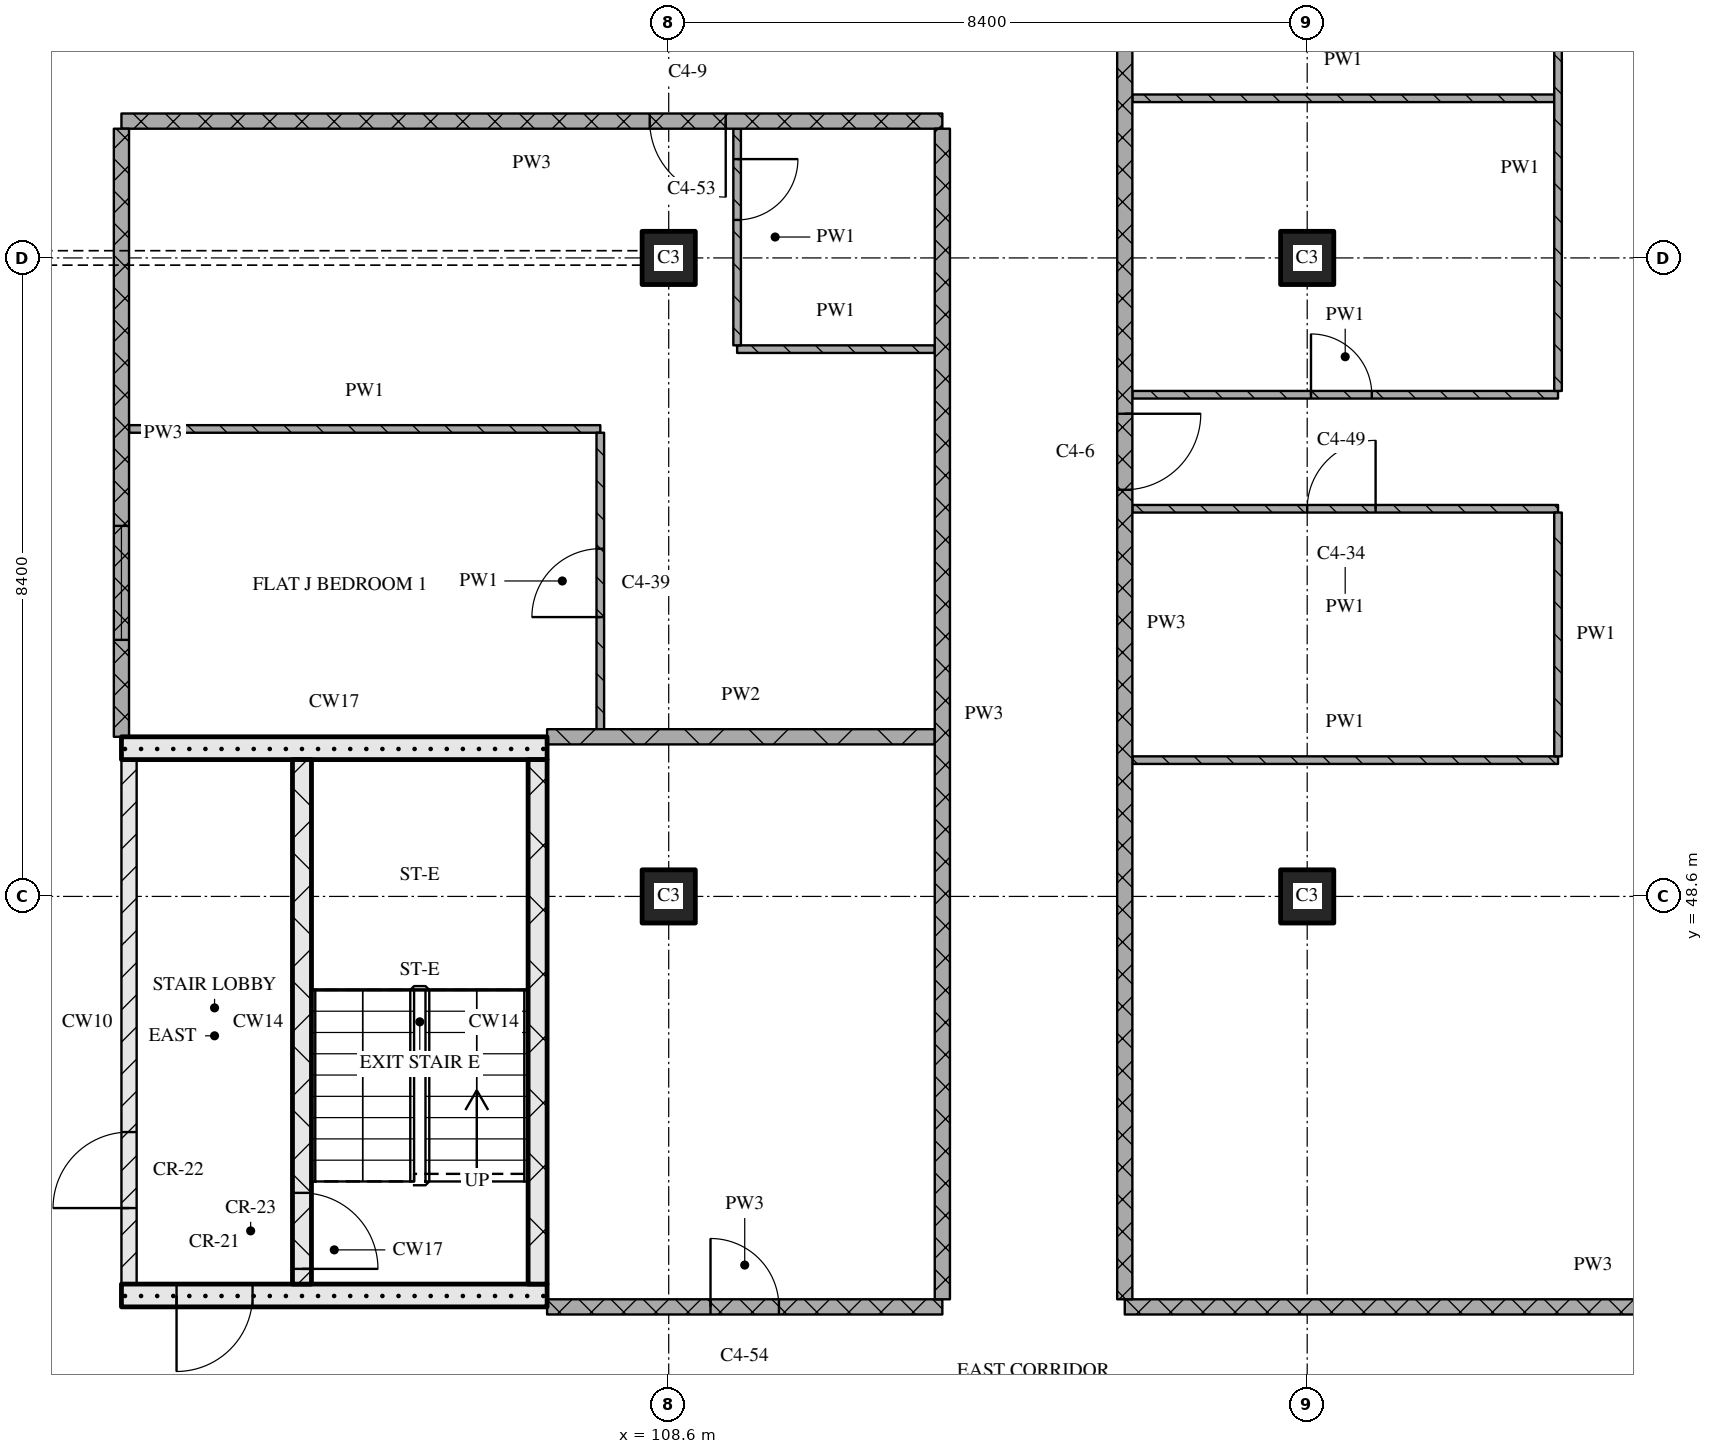
"""IFC4 building model, lengths in metres.
Left out: names, types, materials, properties, quantities, classifications, styles, units other than length and angle.
Written with IfcOpenShell. Run it as: python <this file> out.ifc"""

import sys

from ifc_helpers import new_model, si_unit, direction, frame, frame_2d, origin, origin_2d, place, context, subcontext, project, spatial, rectangle, extrude, element, fill, save


model = new_model("IFC4")
c1 = context("Model", 3, precision=1e-05, world=origin(), true_north=direction((0.0, 1.0)))
c2 = subcontext(c1, "Body", "Model", "MODEL_VIEW")
j1 = project(units=[si_unit("LENGTHUNIT", "METRE"), si_unit("PLANEANGLEUNIT", "RADIAN")], contexts=[c1])
p1 = place(None, origin())
s1 = spatial("IfcSite", under=j1, at=p1, CompositionType="ELEMENT")
p2 = place(p1, origin())
s2 = spatial("IfcBuilding", under=s1, at=p2, CompositionType="ELEMENT")
p3 = place(p2, frame((0.0, 0.0, 179.85)))
s3 = spatial("IfcBuildingStorey", under=s2, at=p3, CompositionType="ELEMENT", Elevation=179.85)
for number, where, z_axis, x_axis in (
    (1, (108.6, 48.6, 0.0), (0.0, 0.0, 1.0), (1.0, 0.0, 0.0)),
    (2, (108.6, 57.0, 0.0), (0.0, 0.0, 1.0), (1.0, 0.0, 0.0)),
    (3, (117.0, 48.6, 0.0), (0.0, 0.0, 1.0), (1.0, 0.0, 0.0)),
    (4, (117.0, 57.0, 0.0), (0.0, 0.0, 1.0), (1.0, 0.0, 0.0)),
):
    element("IfcColumn", number, at=place(p3, frame(where, z_axis=z_axis, x_axis=x_axis)), inside=s3, PredefinedType="COLUMN", context=c2, shape_type="SweptSolid", body=[
        extrude(rectangle(XDim=0.7, YDim=0.7, at=origin_2d()), origin(), (0.0, 0.0, 1.0), 3.6),
    ])
p4 = place(p3, frame((101.4, 43.35, 0.0), z_axis=(0.0, 0.0, 1.0), x_axis=(1.0, 0.0, 0.0)))
e5 = element("IfcWall", 5, at=p4, inside=s3, PredefinedType="SOLIDWALL", context=c2, shape_type="SweptSolid", body=[
    extrude(rectangle(XDim=5.6, YDim=0.3, at=frame_2d((2.8, 0.0))), origin(), (0.0, 0.0, 1.0), 3.32),
])
p5 = place(p4, frame((0.725, 0.0, 0.0)))
e6 = element("IfcOpeningElement", 6, at=p5, cuts=e5, PredefinedType="OPENING", context=c2, shape_type="SweptSolid", body=[
    extrude(rectangle(XDim=1.0, YDim=2.1, at=frame_2d((0.5, 1.05))), frame((0.0, 0.16, 0.0), z_axis=(0.0, -1.0, 0.0), x_axis=(1.0, 0.0, 0.0)), (0.0, 0.0, 1.0), 0.32),
])
p6 = place(p3, frame((101.5, 43.5, 0.0), z_axis=(0.0, 0.0, 1.0), x_axis=(0.0, 1.0, 0.0)))
e7 = element("IfcWall", 7, at=p6, inside=s3, PredefinedType="PARTITIONING", context=c2, shape_type="SweptSolid", body=[
    extrude(rectangle(XDim=6.9, YDim=0.2, at=frame_2d((3.45, 0.0))), origin(), (0.0, 0.0, 1.0), 3.32),
])
p7 = place(p6, frame((1.0, 0.0, 0.0)))
e8 = element("IfcOpeningElement", 8, at=p7, cuts=e7, PredefinedType="OPENING", context=c2, shape_type="SweptSolid", body=[
    extrude(rectangle(XDim=1.0, YDim=2.1, at=frame_2d((0.5, 1.05))), frame((0.0, 0.11, 0.0), z_axis=(0.0, -1.0, 0.0), x_axis=(1.0, 0.0, 0.0)), (0.0, 0.0, 1.0), 0.22),
])
p8 = place(p3, frame((103.775, 43.5, 0.0), z_axis=(0.0, 0.0, 1.0), x_axis=(0.0, 1.0, 0.0)))
e9 = element("IfcWall", 9, at=p8, inside=s3, PredefinedType="SOLIDWALL", context=c2, shape_type="SweptSolid", body=[
    extrude(rectangle(XDim=6.9, YDim=0.25, at=frame_2d((3.45, 0.0))), origin(), (0.0, 0.0, 1.0), 3.32),
])
p9 = place(p8, frame((0.2, 0.0, 0.0)))
e10 = element("IfcOpeningElement", 10, at=p9, cuts=e9, PredefinedType="OPENING", context=c2, shape_type="SweptSolid", body=[
    extrude(rectangle(XDim=1.0, YDim=2.1, at=frame_2d((0.5, 1.05))), frame((0.0, 0.135, 0.0), z_axis=(0.0, -1.0, 0.0), x_axis=(1.0, 0.0, 0.0)), (0.0, 0.0, 1.0), 0.27),
])
p10 = place(p3, frame((106.875, 43.5, 0.0), z_axis=(0.0, 0.0, 1.0), x_axis=(0.0, 1.0, 0.0)))
e11 = element("IfcWall", 11, at=p10, inside=s3, PredefinedType="SOLIDWALL", context=c2, shape_type="SweptSolid", body=[
    extrude(rectangle(XDim=6.9, YDim=0.25, at=frame_2d((3.45, 0.0))), origin(), (0.0, 0.0, 1.0), 3.32),
])
p11 = place(p3, frame((101.4, 50.55, 0.0), z_axis=(0.0, 0.0, 1.0), x_axis=(1.0, 0.0, 0.0)))
e12 = element("IfcWall", 12, at=p11, inside=s3, PredefinedType="SOLIDWALL", context=c2, shape_type="SweptSolid", body=[
    extrude(rectangle(XDim=5.6, YDim=0.3, at=frame_2d((2.8, 0.0))), origin(), (0.0, 0.0, 1.0), 3.32),
])
p12 = place(p3, frame((107.0, 43.2, 0.0), z_axis=(0.0, 0.0, 1.0), x_axis=(1.0, 0.0, 0.0)))
e13 = element("IfcWall", 13, at=p12, inside=s3, PredefinedType="PARTITIONING", context=c2, shape_type="SweptSolid", body=[
    extrude(rectangle(XDim=5.2, YDim=0.2, at=frame_2d((2.6, 0.0))), origin(), (0.0, 0.0, 1.0), 3.32),
])
p13 = place(p12, frame((2.15, 0.0, 0.0)))
e14 = element("IfcOpeningElement", 14, at=p13, cuts=e13, PredefinedType="OPENING", context=c2, shape_type="SweptSolid", body=[
    extrude(rectangle(XDim=0.9, YDim=2.1, at=frame_2d((0.45, 1.05))), frame((0.0, 0.11, 0.0), z_axis=(0.0, -1.0, 0.0), x_axis=(1.0, 0.0, 0.0)), (0.0, 0.0, 1.0), 0.22),
])
p14 = place(p3, frame((114.6, 43.2, 0.0), z_axis=(0.0, 0.0, 1.0), x_axis=(1.0, 0.0, 0.0)))
e15 = element("IfcWall", 15, at=p14, inside=s3, PredefinedType="PARTITIONING", context=c2, shape_type="SweptSolid", body=[
    extrude(rectangle(XDim=12.32, YDim=0.2, at=frame_2d((6.16, 0.0))), origin(), (0.0, 0.0, 1.0), 3.32),
])
p15 = place(p3, frame((114.7, 50.393, 0.0), z_axis=(0.0, 0.0, 1.0), x_axis=(1.0, 0.0, 0.0)))
e16 = element("IfcWall", 16, at=p15, inside=s3, PredefinedType="PARTITIONING", context=c2, shape_type="SweptSolid", body=[
    extrude(rectangle(XDim=5.6, YDim=0.1, at=frame_2d((2.8, 0.0))), origin(), (0.0, 0.0, 1.0), 3.32),
])
p16 = place(p3, frame((107.0, 50.7, 0.0), z_axis=(0.0, 0.0, 1.0), x_axis=(1.0, 0.0, 0.0)))
e17 = element("IfcWall", 17, at=p16, inside=s3, PredefinedType="PARTITIONING", context=c2, shape_type="SweptSolid", body=[
    extrude(rectangle(XDim=5.1, YDim=0.2, at=frame_2d((2.55, 0.0))), origin(), (0.0, 0.0, 1.0), 3.32),
])
p17 = place(p3, frame((120.3, 53.7, 0.0), z_axis=(0.0, 0.0, 1.0), x_axis=(-1.0, 0.0, 0.0)))
e18 = element("IfcWall", 18, at=p17, inside=s3, PredefinedType="PARTITIONING", context=c2, shape_type="SweptSolid", body=[
    extrude(rectangle(XDim=5.6, YDim=0.1, at=frame_2d((2.8, 0.0))), origin(), (0.0, 0.0, 1.0), 3.32),
])
p18 = place(p17, frame((2.4, 0.0, 0.0)))
e19 = element("IfcOpeningElement", 19, at=p18, cuts=e18, PredefinedType="OPENING", context=c2, shape_type="SweptSolid", body=[
    extrude(rectangle(XDim=0.9, YDim=2.1, at=frame_2d((0.45, 1.05))), frame((0.0, 0.06, 0.0), z_axis=(0.0, -1.0, 0.0), x_axis=(1.0, 0.0, 0.0)), (0.0, 0.0, 1.0), 0.12),
])
p19 = place(p3, frame((101.5, 54.75, 0.0), z_axis=(0.0, 0.0, 1.0), x_axis=(1.0, 0.0, 0.0)))
e20 = element("IfcWall", 20, at=p19, inside=s3, PredefinedType="PARTITIONING", context=c2, shape_type="SweptSolid", body=[
    extrude(rectangle(XDim=6.2, YDim=0.1, at=frame_2d((3.1, 0.0))), origin(), (0.0, 0.0, 1.0), 3.32),
])
p20 = place(p3, frame((114.7, 55.2, 0.0), z_axis=(0.0, 0.0, 1.0), x_axis=(1.0, 0.0, 0.0)))
e21 = element("IfcWall", 21, at=p20, inside=s3, PredefinedType="PARTITIONING", context=c2, shape_type="SweptSolid", body=[
    extrude(rectangle(XDim=5.6, YDim=0.1, at=frame_2d((2.8, 0.0))), origin(), (0.0, 0.0, 1.0), 3.32),
])
p21 = place(p20, frame((2.35, 0.0, 0.0)))
e22 = element("IfcOpeningElement", 22, at=p21, cuts=e21, PredefinedType="OPENING", context=c2, shape_type="SweptSolid", body=[
    extrude(rectangle(XDim=0.8, YDim=2.1, at=frame_2d((0.4, 1.05))), frame((0.0, 0.06, 0.0), z_axis=(0.0, -1.0, 0.0), x_axis=(1.0, 0.0, 0.0)), (0.0, 0.0, 1.0), 0.12),
])
p22 = place(p3, frame((109.5, 55.8, 0.0), z_axis=(0.0, 0.0, 1.0), x_axis=(1.0, 0.0, 0.0)))
e23 = element("IfcWall", 23, at=p22, inside=s3, PredefinedType="PARTITIONING", context=c2, shape_type="SweptSolid", body=[
    extrude(rectangle(XDim=2.6, YDim=0.1, at=frame_2d((1.3, 0.0))), origin(), (0.0, 0.0, 1.0), 3.32),
])
p23 = place(p3, frame((112.2, 58.8, 0.0), z_axis=(0.0, 0.0, 1.0), x_axis=(-1.0, 0.0, 0.0)))
e24 = element("IfcWall", 24, at=p23, inside=s3, PredefinedType="PARTITIONING", context=c2, shape_type="SweptSolid", body=[
    extrude(rectangle(XDim=10.8, YDim=0.2, at=frame_2d((5.4, 0.0))), origin(), (0.0, 0.0, 1.0), 3.32),
])
p24 = place(p23, frame((2.85, 0.0, 0.0)))
e25 = element("IfcOpeningElement", 25, at=p24, cuts=e24, PredefinedType="OPENING", context=c2, shape_type="SweptSolid", body=[
    extrude(rectangle(XDim=1.0, YDim=2.1, at=frame_2d((0.5, 1.05))), frame((0.0, 0.11, 0.0), z_axis=(0.0, -1.0, 0.0), x_axis=(1.0, 0.0, 0.0)), (0.0, 0.0, 1.0), 0.22),
])
p25 = place(p3, frame((114.7, 59.1, 0.0), z_axis=(0.0, 0.0, 1.0), x_axis=(1.0, 0.0, 0.0)))
e26 = element("IfcWall", 26, at=p25, inside=s3, PredefinedType="PARTITIONING", context=c2, shape_type="SweptSolid", body=[
    extrude(rectangle(XDim=5.55, YDim=0.1, at=frame_2d((2.775, 0.0))), origin(), (0.0, 0.0, 1.0), 3.32),
])
p26 = place(p3, frame((101.4, 58.7, 0.0), z_axis=(0.0, 0.0, 1.0), x_axis=(0.0, -1.0, 0.0)))
e27 = element("IfcWall", 27, at=p26, inside=s3, PredefinedType="PARTITIONING", context=c2, shape_type="SweptSolid", body=[
    extrude(rectangle(XDim=8.0, YDim=0.2, at=frame_2d((4.0, 0.0))), origin(), (0.0, 0.0, 1.0), 3.32),
])
p27 = place(p26, frame((5.225, 0.0, 0.9)))
e28 = element("IfcOpeningElement", 28, at=p27, cuts=e27, PredefinedType="OPENING", context=c2, shape_type="SweptSolid", body=[
    extrude(rectangle(XDim=1.5, YDim=1.5, at=frame_2d((0.75, 0.75))), frame((0.0, 0.11, 0.0), z_axis=(0.0, -1.0, 0.0), x_axis=(1.0, 0.0, 0.0)), (0.0, 0.0, 1.0), 0.22),
])
p28 = place(p3, frame((107.7, 50.8, 0.0), z_axis=(0.0, 0.0, 1.0), x_axis=(0.0, 1.0, 0.0)))
e29 = element("IfcWall", 29, at=p28, inside=s3, PredefinedType="PARTITIONING", context=c2, shape_type="SweptSolid", body=[
    extrude(rectangle(XDim=3.9, YDim=0.1, at=frame_2d((1.95, 0.0))), origin(), (0.0, 0.0, 1.0), 3.32),
])
p29 = place(p28, frame((1.475, 0.0, 0.0)))
e30 = element("IfcOpeningElement", 30, at=p29, cuts=e29, PredefinedType="OPENING", context=c2, shape_type="SweptSolid", body=[
    extrude(rectangle(XDim=0.9, YDim=2.1, at=frame_2d((0.45, 1.05))), frame((0.0, 0.06, 0.0), z_axis=(0.0, -1.0, 0.0), x_axis=(1.0, 0.0, 0.0)), (0.0, 0.0, 1.0), 0.12),
])
p30 = place(p3, frame((109.5, 58.7, 0.0), z_axis=(0.0, 0.0, 1.0), x_axis=(0.0, -1.0, 0.0)))
e31 = element("IfcWall", 31, at=p30, inside=s3, PredefinedType="PARTITIONING", context=c2, shape_type="SweptSolid", body=[
    extrude(rectangle(XDim=2.85, YDim=0.1, at=frame_2d((1.425, 0.0))), origin(), (0.0, 0.0, 1.0), 3.32),
])
p31 = place(p30, frame((0.4, 0.0, 0.0)))
e32 = element("IfcOpeningElement", 32, at=p31, cuts=e31, PredefinedType="OPENING", context=c2, shape_type="SweptSolid", body=[
    extrude(rectangle(XDim=0.8, YDim=2.1, at=frame_2d((0.4, 1.05))), frame((0.0, 0.06, 0.0), z_axis=(0.0, -1.0, 0.0), x_axis=(1.0, 0.0, 0.0)), (0.0, 0.0, 1.0), 0.12),
])
p32 = place(p3, frame((112.2, 58.7, 0.0), z_axis=(0.0, 0.0, 1.0), x_axis=(0.0, -1.0, 0.0)))
e33 = element("IfcWall", 33, at=p32, inside=s3, PredefinedType="PARTITIONING", context=c2, shape_type="SweptSolid", body=[
    extrude(rectangle(XDim=15.4, YDim=0.2, at=frame_2d((7.7, 0.0))), origin(), (0.0, 0.0, 1.0), 3.32),
])
p33 = place(p3, frame((114.6, 61.1, 0.0), z_axis=(0.0, 0.0, 1.0), x_axis=(0.0, -1.0, 0.0)))
e34 = element("IfcWall", 34, at=p33, inside=s3, PredefinedType="PARTITIONING", context=c2, shape_type="SweptSolid", body=[
    extrude(rectangle(XDim=17.8, YDim=0.2, at=frame_2d((8.9, 0.0))), origin(), (0.0, 0.0, 1.0), 3.32),
])
p34 = place(p33, frame((6.15, 0.0, 0.0)))
e35 = element("IfcOpeningElement", 35, at=p34, cuts=e34, PredefinedType="OPENING", context=c2, shape_type="SweptSolid", body=[
    extrude(rectangle(XDim=1.0, YDim=2.1, at=frame_2d((0.5, 1.05))), frame((0.0, 0.11, 0.0), z_axis=(0.0, -1.0, 0.0), x_axis=(1.0, 0.0, 0.0)), (0.0, 0.0, 1.0), 0.22),
])
p35 = place(p3, frame((120.3, 53.65, 0.0), z_axis=(0.0, 0.0, 1.0), x_axis=(0.0, -1.0, 0.0)))
e36 = element("IfcWall", 36, at=p35, inside=s3, PredefinedType="PARTITIONING", context=c2, shape_type="SweptSolid", body=[
    extrude(rectangle(XDim=3.207, YDim=0.1, at=frame_2d((1.604, 0.0))), origin(), (0.0, 0.0, 1.0), 3.32),
])
p36 = place(p3, frame((120.3, 55.25, 0.0), z_axis=(0.0, 0.0, 1.0), x_axis=(0.0, 1.0, 0.0)))
e37 = element("IfcWall", 37, at=p36, inside=s3, PredefinedType="PARTITIONING", context=c2, shape_type="SweptSolid", body=[
    extrude(rectangle(XDim=5.85, YDim=0.1, at=frame_2d((2.925, 0.0))), origin(), (0.0, 0.0, 1.0), 3.32),
])
p37 = place(p36, frame((4.5, 0.0, 0.0)))
e38 = element("IfcOpeningElement", 38, at=p37, cuts=e37, PredefinedType="OPENING", context=c2, shape_type="SweptSolid", body=[
    extrude(rectangle(XDim=0.8, YDim=2.1, at=frame_2d((0.4, 1.05))), frame((0.0, 0.06, 0.0), z_axis=(0.0, -1.0, 0.0), x_axis=(1.0, 0.0, 0.0)), (0.0, 0.0, 1.0), 0.12),
])
p38 = place(p5, origin())
e39 = element("IfcDoor", 39, at=p38, inside=s3, OperationType="SINGLE_SWING_RIGHT", PredefinedType="DOOR", context=c2, shape_type="SweptSolid", body=[
    extrude(rectangle(XDim=1.0, YDim=2.1, at=frame_2d((0.5, 1.05))), frame((0.0, 0.025, 0.0), z_axis=(0.0, -1.0, 0.0), x_axis=(1.0, 0.0, 0.0)), (0.0, 0.0, 1.0), 0.05),
])
fill(e6, e39)
p39 = place(p9, origin())
e40 = element("IfcDoor", 40, at=p39, inside=s3, OperationType="SINGLE_SWING_RIGHT", PredefinedType="DOOR", context=c2, shape_type="SweptSolid", body=[
    extrude(rectangle(XDim=1.0, YDim=2.1, at=frame_2d((0.5, 1.05))), frame((0.0, 0.025, 0.0), z_axis=(0.0, -1.0, 0.0), x_axis=(1.0, 0.0, 0.0)), (0.0, 0.0, 1.0), 0.05),
])
fill(e10, e40)
p40 = place(p7, origin())
e41 = element("IfcDoor", 41, at=p40, inside=s3, OperationType="SINGLE_SWING_LEFT", PredefinedType="DOOR", context=c2, shape_type="SweptSolid", body=[
    extrude(rectangle(XDim=1.0, YDim=2.1, at=frame_2d((0.5, 1.05))), frame((0.0, 0.025, 0.0), z_axis=(0.0, -1.0, 0.0), x_axis=(1.0, 0.0, 0.0)), (0.0, 0.0, 1.0), 0.05),
])
fill(e8, e41)
p41 = place(p13, origin())
e42 = element("IfcDoor", 42, at=p41, inside=s3, OperationType="SINGLE_SWING_LEFT", PredefinedType="DOOR", context=c2, shape_type="SweptSolid", body=[
    extrude(rectangle(XDim=0.9, YDim=2.1, at=frame_2d((0.45, 1.05))), frame((0.0, 0.025, 0.0), z_axis=(0.0, -1.0, 0.0), x_axis=(1.0, 0.0, 0.0)), (0.0, 0.0, 1.0), 0.05),
])
fill(e14, e42)
p42 = place(p18, origin())
e43 = element("IfcDoor", 43, at=p42, inside=s3, OperationType="SINGLE_SWING_RIGHT", PredefinedType="DOOR", context=c2, shape_type="SweptSolid", body=[
    extrude(rectangle(XDim=0.9, YDim=2.1, at=frame_2d((0.45, 1.05))), frame((0.0, 0.025, 0.0), z_axis=(0.0, -1.0, 0.0), x_axis=(1.0, 0.0, 0.0)), (0.0, 0.0, 1.0), 0.05),
])
fill(e19, e43)
p43 = place(p21, origin())
e44 = element("IfcDoor", 44, at=p43, inside=s3, OperationType="SINGLE_SWING_LEFT", PredefinedType="DOOR", context=c2, shape_type="SweptSolid", body=[
    extrude(rectangle(XDim=0.8, YDim=2.1, at=frame_2d((0.4, 1.05))), frame((0.0, 0.025, 0.0), z_axis=(0.0, -1.0, 0.0), x_axis=(1.0, 0.0, 0.0)), (0.0, 0.0, 1.0), 0.05),
])
fill(e22, e44)
p44 = place(p24, origin())
e45 = element("IfcDoor", 45, at=p44, inside=s3, OperationType="SINGLE_SWING_LEFT", PredefinedType="DOOR", context=c2, shape_type="SweptSolid", body=[
    extrude(rectangle(XDim=1.0, YDim=2.1, at=frame_2d((0.5, 1.05))), frame((0.0, 0.025, 0.0), z_axis=(0.0, -1.0, 0.0), x_axis=(1.0, 0.0, 0.0)), (0.0, 0.0, 1.0), 0.05),
])
fill(e25, e45)
p45 = place(p29, origin())
e46 = element("IfcDoor", 46, at=p45, inside=s3, OperationType="SINGLE_SWING_LEFT", PredefinedType="DOOR", context=c2, shape_type="SweptSolid", body=[
    extrude(rectangle(XDim=0.9, YDim=2.1, at=frame_2d((0.45, 1.05))), frame((0.0, 0.025, 0.0), z_axis=(0.0, -1.0, 0.0), x_axis=(1.0, 0.0, 0.0)), (0.0, 0.0, 1.0), 0.05),
])
fill(e30, e46)
p46 = place(p31, origin())
e47 = element("IfcDoor", 47, at=p46, inside=s3, OperationType="SINGLE_SWING_LEFT", PredefinedType="DOOR", context=c2, shape_type="SweptSolid", body=[
    extrude(rectangle(XDim=0.8, YDim=2.1, at=frame_2d((0.4, 1.05))), frame((0.0, 0.025, 0.0), z_axis=(0.0, -1.0, 0.0), x_axis=(1.0, 0.0, 0.0)), (0.0, 0.0, 1.0), 0.05),
])
fill(e32, e47)
p47 = place(p34, origin())
e48 = element("IfcDoor", 48, at=p47, inside=s3, OperationType="SINGLE_SWING_LEFT", PredefinedType="DOOR", context=c2, shape_type="SweptSolid", body=[
    extrude(rectangle(XDim=1.0, YDim=2.1, at=frame_2d((0.5, 1.05))), frame((0.0, 0.025, 0.0), z_axis=(0.0, -1.0, 0.0), x_axis=(1.0, 0.0, 0.0)), (0.0, 0.0, 1.0), 0.05),
])
fill(e35, e48)
p48 = place(p27, origin())
e49 = element("IfcWindow", 49, at=p48, inside=s3, PartitioningType="SINGLE_PANEL", PredefinedType="WINDOW", context=c2, shape_type="SweptSolid", body=[
    extrude(rectangle(XDim=1.5, YDim=1.5, at=frame_2d((0.75, 0.75))), frame((0.0, 0.03, 0.0), z_axis=(0.0, -1.0, 0.0), x_axis=(1.0, 0.0, 0.0)), (0.0, 0.0, 1.0), 0.06),
])
fill(e28, e49)
save(model, sys.argv[1])
